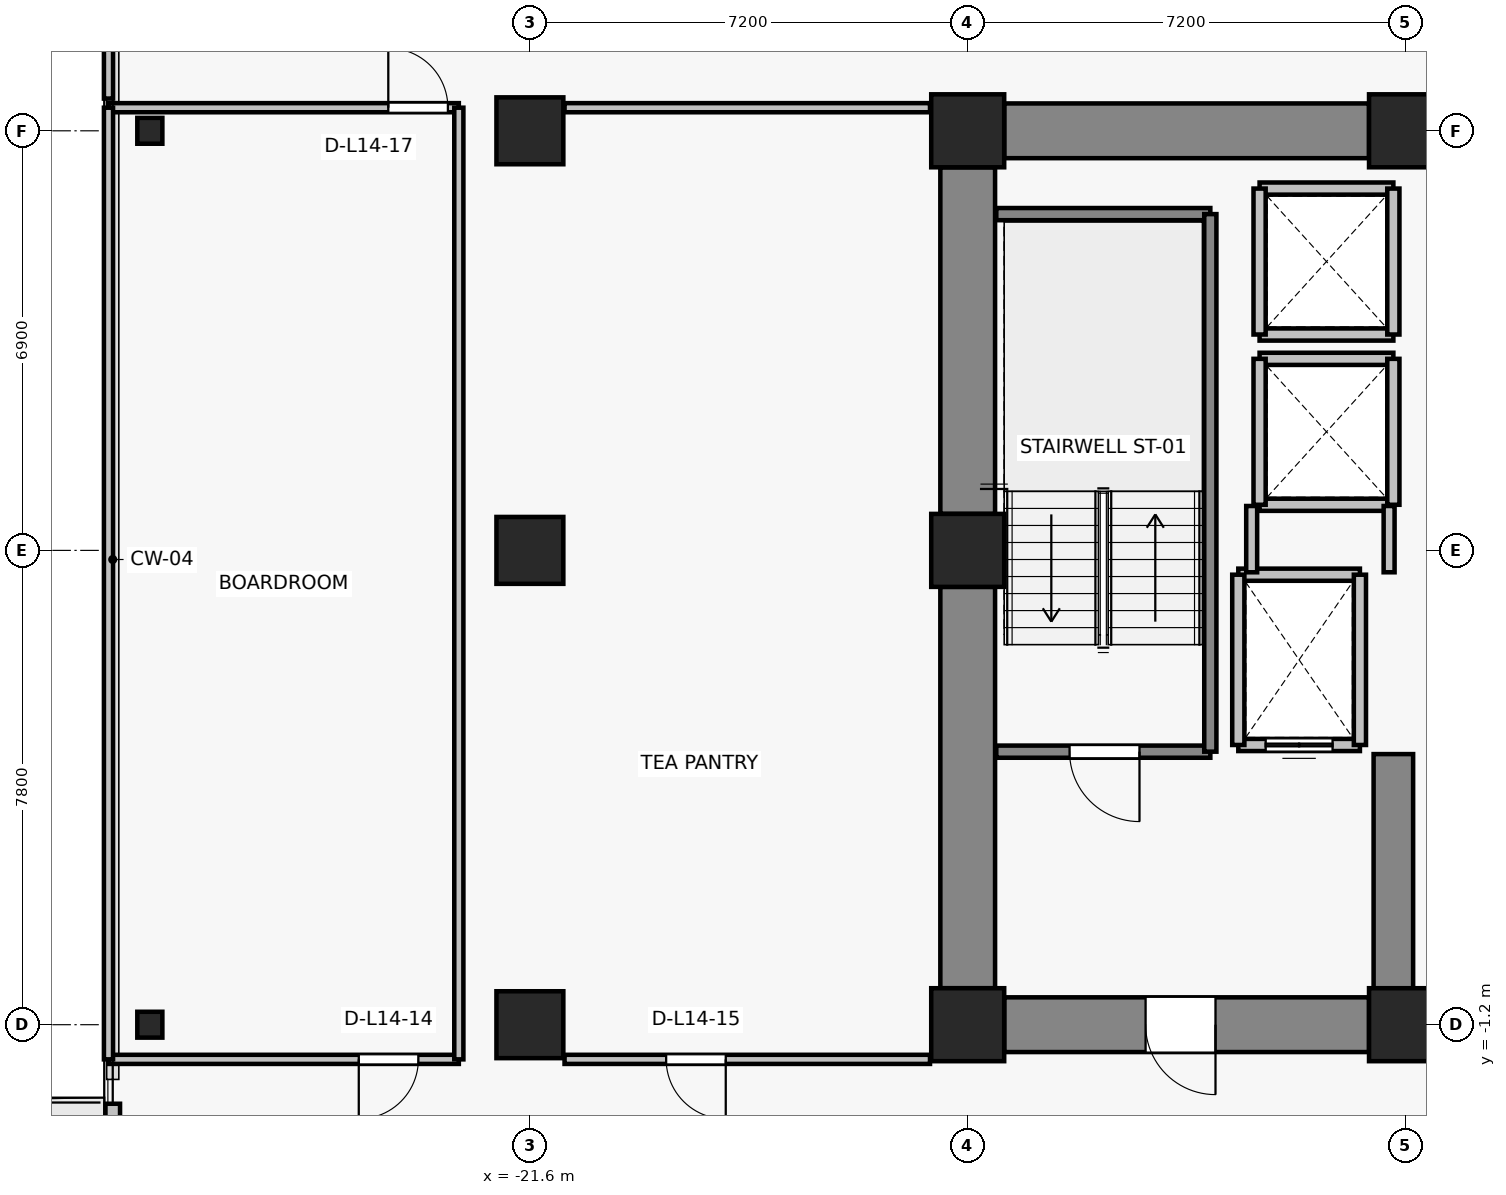
"""IFC4 building model, lengths in metres.
Left out: names, types, materials, properties, quantities, classifications, styles, units other than length and angle.
Written with IfcOpenShell. Run it as: python <this file> out.ifc"""

import sys

from ifc_helpers import new_model, si_unit, direction, frame, frame_2d, origin, origin_2d, place, context, subcontext, project, spatial, rectangle, i_section, extrude, source, transform, mapped, element, fill, save


model = new_model("IFC4")
c1 = context("Model", 3, precision=1e-05, world=origin(), true_north=direction((0.0, 1.0)))
c2 = subcontext(c1, "Body", "Model", "MODEL_VIEW")
j1 = project(units=[si_unit("LENGTHUNIT", "METRE"), si_unit("PLANEANGLEUNIT", "RADIAN")], contexts=[c1])
p1 = place(None, origin())
s1 = spatial("IfcSite", under=j1, at=p1, CompositionType="ELEMENT")
p2 = place(p1, origin())
s2 = spatial("IfcBuilding", under=s1, at=p2, CompositionType="ELEMENT")
p3 = place(p2, frame((0.0, 0.0, 53.8)))
s3 = spatial("IfcBuildingStorey", under=s2, at=p3, CompositionType="ELEMENT", Elevation=53.8)
for number, where, z_axis, x_axis in (
    (1, (-14.4, -1.2, 0.0), (0.0, 0.0, 1.0), (1.0, 0.0, 0.0)),
    (2, (-7.2, -1.2, 0.0), (0.0, 0.0, 1.0), (1.0, 0.0, 0.0)),
    (3, (-14.4, 6.6, 0.0), (0.0, 0.0, 1.0), (1.0, 0.0, 0.0)),
    (4, (-14.4, 13.5, 0.0), (0.0, 0.0, 1.0), (1.0, 0.0, 0.0)),
    (5, (-7.2, 13.5, 0.0), (0.0, 0.0, 1.0), (1.0, 0.0, 0.0)),
):
    element("IfcColumn", number, at=place(p3, frame(where, z_axis=z_axis, x_axis=x_axis)), inside=s3, PredefinedType="COLUMN", context=c2, shape_type="SweptSolid", body=[
        extrude(rectangle(XDim=1.2, YDim=1.2, at=origin_2d()), origin(), (0.0, 0.0, 1.0), 3.3),
    ])
for number, where, z_axis, x_axis in (
    (6, (-21.6, -1.2, 0.0), (0.0, 0.0, 1.0), (1.0, 0.0, 0.0)),
    (7, (-21.6, 6.6, 0.0), (0.0, 0.0, 1.0), (1.0, 0.0, 0.0)),
    (8, (-21.6, 13.5, 0.0), (0.0, 0.0, 1.0), (1.0, 0.0, 0.0)),
):
    element("IfcColumn", number, at=place(p3, frame(where, z_axis=z_axis, x_axis=x_axis)), inside=s3, PredefinedType="COLUMN", context=c2, shape_type="SweptSolid", body=[
        extrude(rectangle(XDim=1.1, YDim=1.1, at=origin_2d()), origin(), (0.0, 0.0, 1.0), 3.3),
    ])
for number, where, z_axis, x_axis in (
    (9, (-27.85, -1.2, 0.0), (0.0, 0.0, 1.0), (1.0, 0.0, 0.0)),
    (10, (-27.85, 13.5, 0.0), (0.0, 0.0, 1.0), (1.0, 0.0, 0.0)),
):
    element("IfcColumn", number, at=place(p3, frame(where, z_axis=z_axis, x_axis=x_axis)), inside=s3, PredefinedType="COLUMN", context=c2, shape_type="SweptSolid", body=[
        extrude(i_section(OverallWidth=0.412, OverallDepth=0.425, WebThickness=0.026, FlangeThickness=0.039, FilletRadius=0.015, at=origin_2d()), origin(), (0.0, 0.0, 1.0), 3.3),
    ])
p4 = place(p3, frame((-13.8, 13.5, 0.0), z_axis=(0.0, 0.0, 1.0), x_axis=(1.0, 0.0, 0.0)))
e11 = element("IfcWall", 11, at=p4, inside=s3, PredefinedType="SHEAR", context=c2, shape_type="SweptSolid", body=[
    extrude(rectangle(XDim=6.0, YDim=0.9, at=frame_2d((3.0, 0.0))), origin(), (0.0, 0.0, 1.0), 3.075),
])
p5 = place(p3, frame((-14.4, -0.6, 0.0), z_axis=(0.0, 0.0, 1.0), x_axis=(0.0, 1.0, 0.0)))
e12 = element("IfcWall", 12, at=p5, inside=s3, PredefinedType="SHEAR", context=c2, shape_type="SweptSolid", body=[
    extrude(rectangle(XDim=6.6, YDim=0.9, at=frame_2d((3.3, 0.0))), origin(), (0.0, 0.0, 1.0), 3.075),
])
p6 = place(p3, frame((-14.4, 7.2, 0.0), z_axis=(0.0, 0.0, 1.0), x_axis=(0.0, 1.0, 0.0)))
e13 = element("IfcWall", 13, at=p6, inside=s3, PredefinedType="SHEAR", context=c2, shape_type="SweptSolid", body=[
    extrude(rectangle(XDim=5.7, YDim=0.9, at=frame_2d((2.85, 0.0))), origin(), (0.0, 0.0, 1.0), 3.075),
])
p7 = place(p3, frame((-7.8, -1.2, 0.0), z_axis=(0.0, 0.0, 1.0), x_axis=(-1.0, 0.0, 0.0)))
e14 = element("IfcWall", 14, at=p7, inside=s3, PredefinedType="SHEAR", context=c2, shape_type="SweptSolid", body=[
    extrude(rectangle(XDim=6.0, YDim=0.9, at=frame_2d((3.0, 0.0))), origin(), (0.0, 0.0, 1.0), 3.075),
])
p8 = place(p7, frame((2.525, 0.0, 0.0)))
e15 = element("IfcOpeningElement", 15, at=p8, cuts=e14, PredefinedType="OPENING", context=c2, shape_type="SweptSolid", body=[
    extrude(rectangle(XDim=1.15, YDim=2.15, at=frame_2d((0.575, 1.075))), frame((0.0, 0.46, 0.0), z_axis=(0.0, -1.0, 0.0), x_axis=(1.0, 0.0, 0.0)), (0.0, 0.0, 1.0), 0.92),
])
p9 = place(p3, frame((-7.4, -0.75, 0.0), z_axis=(0.0, 0.0, 1.0), x_axis=(0.0, 1.0, 0.0)))
e16 = element("IfcWall", 16, at=p9, inside=s3, PredefinedType="SHEAR", context=c2, shape_type="SweptSolid", body=[
    extrude(rectangle(XDim=4.0, YDim=0.65, at=frame_2d((2.0, 0.0))), origin(), (0.0, 0.0, 1.0), 3.075),
])
p10 = place(p3, frame((-28.46, -8.3, 0.0), z_axis=(0.0, 0.0, 1.0), x_axis=(0.0, 1.0, 0.0)))
e17 = element("IfcWall", 17, at=p10, inside=s3, PredefinedType="SOLIDWALL", context=c2, shape_type="SweptSolid", body=[
    extrude(rectangle(XDim=5.8, YDim=0.24, at=frame_2d((2.9, 0.0))), origin(), (0.0, 0.0, 1.0), 3.075),
])
p11 = place(p10, frame((0.696, 0.0, 0.0)))
e18 = element("IfcOpeningElement", 18, at=p11, cuts=e17, PredefinedType="OPENING", context=c2, shape_type="SweptSolid", body=[
    extrude(rectangle(XDim=1.0, YDim=2.2, at=frame_2d((0.5, 1.1))), frame((0.0, 0.13, 0.0), z_axis=(0.0, -1.0, 0.0), x_axis=(1.0, 0.0, 0.0)), (0.0, 0.0, 1.0), 0.26),
])
p12 = place(p10, frame((2.046, 0.0, 0.85)))
e19 = element("IfcOpeningElement", 19, at=p12, cuts=e17, PredefinedType="OPENING", context=c2, shape_type="SweptSolid", body=[
    extrude(rectangle(XDim=1.2, YDim=1.5, at=frame_2d((0.6, 0.75))), frame((0.0, 0.13, 0.0), z_axis=(0.0, -1.0, 0.0), x_axis=(1.0, 0.0, 0.0)), (0.0, 0.0, 1.0), 0.26),
])
p13 = place(p3, frame((-7.95, 3.4, 0.0), z_axis=(0.0, 0.0, 1.0), x_axis=(-1.0, 0.0, 0.0)))
e20 = element("IfcWall", 20, at=p13, inside=s3, PredefinedType="SOLIDWALL", context=c2, shape_type="SweptSolid", body=[
    extrude(rectangle(XDim=2.0, YDim=0.2, at=frame_2d((1.0, 0.0))), origin(), (0.0, 0.0, 1.0), 3.075),
])
p14 = place(p13, frame((0.45, 0.0, 0.0)))
e21 = element("IfcOpeningElement", 21, at=p14, cuts=e20, PredefinedType="OPENING", context=c2, shape_type="SweptSolid", body=[
    extrude(rectangle(XDim=1.1, YDim=2.2, at=frame_2d((0.55, 1.1))), frame((0.0, 0.11, 0.0), z_axis=(0.0, -1.0, 0.0), x_axis=(1.0, 0.0, 0.0)), (0.0, 0.0, 1.0), 0.22),
])
p15 = place(p3, frame((-9.95, 6.2, 0.0), z_axis=(0.0, 0.0, 1.0), x_axis=(1.0, 0.0, 0.0)))
e22 = element("IfcWall", 22, at=p15, inside=s3, PredefinedType="SOLIDWALL", context=c2, shape_type="SweptSolid", body=[
    extrude(rectangle(XDim=2.0, YDim=0.2, at=frame_2d((1.0, 0.0))), origin(), (0.0, 0.0, 1.0), 3.075),
])
for number, where, z_axis, x_axis in (
    (23, (-9.95, 3.4, 0.0), (0.0, 0.0, 1.0), (0.0, 1.0, 0.0)),
    (24, (-7.95, 6.2, 0.0), (0.0, 0.0, 1.0), (0.0, -1.0, 0.0)),
):
    element("IfcWall", number, at=place(p3, frame(where, z_axis=z_axis, x_axis=x_axis)), inside=s3, PredefinedType="SOLIDWALL", context=c2, shape_type="SweptSolid", body=[
        extrude(rectangle(XDim=2.8, YDim=0.2, at=frame_2d((1.4, 0.0))), origin(), (0.0, 0.0, 1.0), 3.075),
    ])
for number, where, z_axis, x_axis in (
    (25, (-7.4, 7.35, 0.0), (0.0, 0.0, 1.0), (-1.0, 0.0, 0.0)),
    (26, (-9.6, 9.75, 0.0), (0.0, 0.0, 1.0), (1.0, 0.0, 0.0)),
):
    element("IfcWall", number, at=place(p3, frame(where, z_axis=z_axis, x_axis=x_axis)), inside=s3, PredefinedType="SOLIDWALL", context=c2, shape_type="SweptSolid", body=[
        extrude(rectangle(XDim=2.2, YDim=0.2, at=frame_2d((1.1, 0.0))), origin(), (0.0, 0.0, 1.0), 2.465),
    ])
p16 = place(p3, frame((-9.6, 7.35, 0.0), z_axis=(0.0, 0.0, 1.0), x_axis=(0.0, 1.0, 0.0)))
e27 = element("IfcWall", 27, at=p16, inside=s3, PredefinedType="SOLIDWALL", context=c2, shape_type="SweptSolid", body=[
    extrude(rectangle(XDim=2.4, YDim=0.2, at=frame_2d((1.2, 0.0))), origin(), (0.0, 0.0, 1.0), 3.075),
])
p17 = place(p3, frame((-7.4, 9.75, 0.0), z_axis=(0.0, 0.0, 1.0), x_axis=(0.0, -1.0, 0.0)))
e28 = element("IfcWall", 28, at=p17, inside=s3, PredefinedType="SOLIDWALL", context=c2, shape_type="SweptSolid", body=[
    extrude(rectangle(XDim=2.4, YDim=0.2, at=frame_2d((1.2, 0.0))), origin(), (0.0, 0.0, 1.0), 2.465),
])
for number, where, z_axis, x_axis in (
    (29, (-7.4, 10.15, 0.0), (0.0, 0.0, 1.0), (-1.0, 0.0, 0.0)),
    (30, (-9.6, 12.55, 0.0), (0.0, 0.0, 1.0), (1.0, 0.0, 0.0)),
):
    element("IfcWall", number, at=place(p3, frame(where, z_axis=z_axis, x_axis=x_axis)), inside=s3, PredefinedType="SOLIDWALL", context=c2, shape_type="SweptSolid", body=[
        extrude(rectangle(XDim=2.2, YDim=0.2, at=frame_2d((1.1, 0.0))), origin(), (0.0, 0.0, 1.0), 2.465),
    ])
p18 = place(p3, frame((-9.6, 10.15, 0.0), z_axis=(0.0, 0.0, 1.0), x_axis=(0.0, 1.0, 0.0)))
e31 = element("IfcWall", 31, at=p18, inside=s3, PredefinedType="SOLIDWALL", context=c2, shape_type="SweptSolid", body=[
    extrude(rectangle(XDim=2.4, YDim=0.2, at=frame_2d((1.2, 0.0))), origin(), (0.0, 0.0, 1.0), 3.075),
])
p19 = place(p3, frame((-7.4, 12.55, 0.0), z_axis=(0.0, 0.0, 1.0), x_axis=(0.0, -1.0, 0.0)))
e32 = element("IfcWall", 32, at=p19, inside=s3, PredefinedType="SOLIDWALL", context=c2, shape_type="SweptSolid", body=[
    extrude(rectangle(XDim=2.4, YDim=0.2, at=frame_2d((1.2, 0.0))), origin(), (0.0, 0.0, 1.0), 2.465),
])
p20 = place(p3, frame((-10.41, 3.29, 0.0), z_axis=(0.0, 0.0, 1.0), x_axis=(-1.0, 0.0, 0.0)))
e33 = element("IfcWall", 33, at=p20, inside=s3, PredefinedType="SOLIDWALL", context=c2, shape_type="SweptSolid", body=[
    extrude(rectangle(XDim=3.52, YDim=0.2, at=frame_2d((1.76, 0.0))), origin(), (0.0, 0.0, 1.0), 3.075),
])
p21 = place(p20, frame((1.165, 0.0, 0.0)))
e34 = element("IfcOpeningElement", 34, at=p21, cuts=e33, PredefinedType="OPENING", context=c2, shape_type="SweptSolid", body=[
    extrude(rectangle(XDim=1.15, YDim=2.15, at=frame_2d((0.575, 1.075))), frame((0.0, 0.11, 0.0), z_axis=(0.0, -1.0, 0.0), x_axis=(1.0, 0.0, 0.0)), (0.0, 0.0, 1.0), 0.22),
])
p22 = place(p3, frame((-13.93, 12.13, 0.0), z_axis=(0.0, 0.0, 1.0), x_axis=(1.0, 0.0, 0.0)))
e35 = element("IfcWall", 35, at=p22, inside=s3, PredefinedType="SOLIDWALL", context=c2, shape_type="SweptSolid", body=[
    extrude(rectangle(XDim=3.52, YDim=0.2, at=frame_2d((1.76, 0.0))), origin(), (0.0, 0.0, 1.0), 3.075),
])
p23 = place(p3, frame((-10.41, 12.13, 0.0), z_axis=(0.0, 0.0, 1.0), x_axis=(0.0, -1.0, 0.0)))
e36 = element("IfcWall", 36, at=p23, inside=s3, PredefinedType="SOLIDWALL", context=c2, shape_type="SweptSolid", body=[
    extrude(rectangle(XDim=8.84, YDim=0.2, at=frame_2d((4.42, 0.0))), origin(), (0.0, 0.0, 1.0), 3.075),
])
p24 = place(p3, frame((-9.73, 6.24, 0.0), z_axis=(0.0, 0.0, 1.0), x_axis=(0.0, 1.0, 0.0)))
e37 = element("IfcWall", 37, at=p24, inside=s3, PredefinedType="PARTITIONING", context=c2, shape_type="SweptSolid", body=[
    extrude(rectangle(XDim=1.09, YDim=0.18, at=frame_2d((0.545, 0.0))), origin(), (0.0, 0.0, 1.0), 3.075),
])
p25 = place(p3, frame((-7.47, 7.33, 0.0), z_axis=(0.0, 0.0, 1.0), x_axis=(0.0, -1.0, 0.0)))
e38 = element("IfcWall", 38, at=p25, inside=s3, PredefinedType="PARTITIONING", context=c2, shape_type="SweptSolid", body=[
    extrude(rectangle(XDim=1.09, YDim=0.18, at=frame_2d((0.545, 0.0))), origin(), (0.0, 0.0, 1.0), 2.465),
])
p26 = place(p3, frame((-22.769, -1.77, 0.0), z_axis=(0.0, 0.0, 1.0), x_axis=(-1.0, 0.0, 0.0)))
e39 = element("IfcWall", 39, at=p26, inside=s3, PredefinedType="PARTITIONING", context=c2, shape_type="SweptSolid", body=[
    extrude(rectangle(XDim=5.761, YDim=0.15, at=frame_2d((2.881, 0.0))), origin(), (0.0, 0.0, 1.0), 2.465),
])
p27 = place(p26, frame((0.666, 0.0, 0.0)))
e40 = element("IfcOpeningElement", 40, at=p27, cuts=e39, PredefinedType="OPENING", context=c2, shape_type="SweptSolid", body=[
    extrude(rectangle(XDim=0.98, YDim=2.15, at=frame_2d((0.49, 1.075))), frame((0.0, 0.085, 0.0), z_axis=(0.0, -1.0, 0.0), x_axis=(1.0, 0.0, 0.0)), (0.0, 0.0, 1.0), 0.17),
])
p28 = place(p3, frame((-28.53, 13.88, 0.0), z_axis=(0.0, 0.0, 1.0), x_axis=(1.0, 0.0, 0.0)))
e41 = element("IfcWall", 41, at=p28, inside=s3, PredefinedType="PARTITIONING", context=c2, shape_type="SweptSolid", body=[
    extrude(rectangle(XDim=5.761, YDim=0.15, at=frame_2d((2.881, 0.0))), origin(), (0.0, 0.0, 1.0), 3.075),
])
p29 = place(p28, frame((4.602, 0.0, 0.0)))
e42 = element("IfcOpeningElement", 42, at=p29, cuts=e41, PredefinedType="OPENING", context=c2, shape_type="SweptSolid", body=[
    extrude(rectangle(XDim=0.98, YDim=2.15, at=frame_2d((0.49, 1.075))), frame((0.0, 0.085, 0.0), z_axis=(0.0, -1.0, 0.0), x_axis=(1.0, 0.0, 0.0)), (0.0, 0.0, 1.0), 0.17),
])
p30 = place(p3, frame((-28.53, -1.77, 0.0), z_axis=(0.0, 0.0, 1.0), x_axis=(0.0, 1.0, 0.0)))
e43 = element("IfcWall", 43, at=p30, inside=s3, PredefinedType="PARTITIONING", context=c2, shape_type="SweptSolid", body=[
    extrude(rectangle(XDim=15.65, YDim=0.15, at=frame_2d((7.825, 0.0))), origin(), (0.0, 0.0, 1.0), 3.075),
])
p31 = place(p3, frame((-22.769, 13.88, 0.0), z_axis=(0.0, 0.0, 1.0), x_axis=(0.0, -1.0, 0.0)))
e44 = element("IfcWall", 44, at=p31, inside=s3, PredefinedType="PARTITIONING", context=c2, shape_type="SweptSolid", body=[
    extrude(rectangle(XDim=15.65, YDim=0.15, at=frame_2d((7.825, 0.0))), origin(), (0.0, 0.0, 1.0), 2.465),
])
p32 = place(p3, frame((-15.02, -1.77, 0.0), z_axis=(0.0, 0.0, 1.0), x_axis=(-1.0, 0.0, 0.0)))
e45 = element("IfcWall", 45, at=p32, inside=s3, PredefinedType="PARTITIONING", context=c2, shape_type="SweptSolid", body=[
    extrude(rectangle(XDim=6.01, YDim=0.15, at=frame_2d((3.005, 0.0))), origin(), (0.0, 0.0, 1.0), 3.075),
])
p33 = place(p32, frame((3.359, 0.0, 0.0)))
e46 = element("IfcOpeningElement", 46, at=p33, cuts=e45, PredefinedType="OPENING", context=c2, shape_type="SweptSolid", body=[
    extrude(rectangle(XDim=0.98, YDim=2.15, at=frame_2d((0.49, 1.075))), frame((0.0, 0.085, 0.0), z_axis=(0.0, -1.0, 0.0), x_axis=(1.0, 0.0, 0.0)), (0.0, 0.0, 1.0), 0.17),
])
p34 = place(p3, frame((-21.03, 13.88, 0.0), z_axis=(0.0, 0.0, 1.0), x_axis=(1.0, 0.0, 0.0)))
e47 = element("IfcWall", 47, at=p34, inside=s3, PredefinedType="PARTITIONING", context=c2, shape_type="SweptSolid", body=[
    extrude(rectangle(XDim=6.01, YDim=0.15, at=frame_2d((3.005, 0.0))), origin(), (0.0, 0.0, 1.0), 3.075),
])
p35 = place(p3, frame((-28.53, 14.03, 0.0), z_axis=(0.0, 0.0, 1.0), x_axis=(0.0, 1.0, 0.0)))
e48 = element("IfcWall", 48, at=p35, inside=s3, PredefinedType="PARTITIONING", context=c2, shape_type="SweptSolid", body=[
    extrude(rectangle(XDim=4.1, YDim=0.15, at=frame_2d((2.05, 0.0))), origin(), (0.0, 0.0, 1.0), 3.075),
])
m1 = source(origin(), c2, "Body", "SweptSolid", [
    extrude(rectangle(XDim=1.1, YDim=2.2, at=frame_2d((0.55, 1.1))), frame((0.0, 0.025, 0.0), z_axis=(0.0, -1.0, 0.0), x_axis=(1.0, 0.0, 0.0)), (0.0, 0.0, 1.0), 0.05),
])
p36 = place(p14, origin())
e49 = element("IfcDoor", 49, at=p36, inside=s3, OperationType="DOUBLE_DOOR_SLIDING", PredefinedType="DOOR", context=c2, shape_type="MappedRepresentation", body=[
    mapped(m1, transform((0.0, 0.0, 0.0), x_axis=(1.0, 0.0, 0.0), y_axis=(0.0, 1.0, 0.0), z_axis=(0.0, 0.0, 1.0), scale=1.0)),
])
fill(e21, e49)
m2 = source(origin(), c2, "Body", "SweptSolid", [
    extrude(rectangle(XDim=1.15, YDim=2.15, at=frame_2d((0.575, 1.075))), frame((0.0, 0.025, 0.0), z_axis=(0.0, -1.0, 0.0), x_axis=(1.0, 0.0, 0.0)), (0.0, 0.0, 1.0), 0.05),
])
p37 = place(p21, origin())
e50 = element("IfcDoor", 50, at=p37, inside=s3, OperationType="SINGLE_SWING_LEFT", PredefinedType="DOOR", context=c2, shape_type="MappedRepresentation", body=[
    mapped(m2, transform((0.0, 0.0, 0.0), x_axis=(1.0, 0.0, 0.0), y_axis=(0.0, 1.0, 0.0), z_axis=(0.0, 0.0, 1.0), scale=1.0)),
])
fill(e34, e50)
p38 = place(p8, origin())
e51 = element("IfcDoor", 51, at=p38, inside=s3, OperationType="SINGLE_SWING_LEFT", PredefinedType="DOOR", context=c2, shape_type="MappedRepresentation", body=[
    mapped(m2, transform((0.0, 0.0, 0.0), x_axis=(1.0, 0.0, 0.0), y_axis=(0.0, 1.0, 0.0), z_axis=(0.0, 0.0, 1.0), scale=1.0)),
])
fill(e15, e51)
m3 = source(origin(), c2, "Body", "SweptSolid", [
    extrude(rectangle(XDim=0.98, YDim=2.15, at=frame_2d((0.49, 1.075))), frame((0.0, 0.025, 0.0), z_axis=(0.0, -1.0, 0.0), x_axis=(1.0, 0.0, 0.0)), (0.0, 0.0, 1.0), 0.05),
])
p39 = place(p27, origin())
e52 = element("IfcDoor", 52, at=p39, inside=s3, OperationType="SINGLE_SWING_RIGHT", PredefinedType="DOOR", context=c2, shape_type="MappedRepresentation", body=[
    mapped(m3, transform((0.0, 0.0, 0.0), x_axis=(1.0, 0.0, 0.0), y_axis=(0.0, 1.0, 0.0), z_axis=(0.0, 0.0, 1.0), scale=1.0)),
])
fill(e40, e52)
p40 = place(p33, origin())
e53 = element("IfcDoor", 53, at=p40, inside=s3, OperationType="SINGLE_SWING_LEFT", PredefinedType="DOOR", context=c2, shape_type="MappedRepresentation", body=[
    mapped(m3, transform((0.0, 0.0, 0.0), x_axis=(1.0, 0.0, 0.0), y_axis=(0.0, 1.0, 0.0), z_axis=(0.0, 0.0, 1.0), scale=1.0)),
])
fill(e46, e53)
p41 = place(p29, origin())
e54 = element("IfcDoor", 54, at=p41, inside=s3, OperationType="SINGLE_SWING_LEFT", PredefinedType="DOOR", context=c2, shape_type="MappedRepresentation", body=[
    mapped(m3, transform((0.0, 0.0, 0.0), x_axis=(1.0, 0.0, 0.0), y_axis=(0.0, 1.0, 0.0), z_axis=(0.0, 0.0, 1.0), scale=1.0)),
])
fill(e42, e54)
save(model, sys.argv[1])
